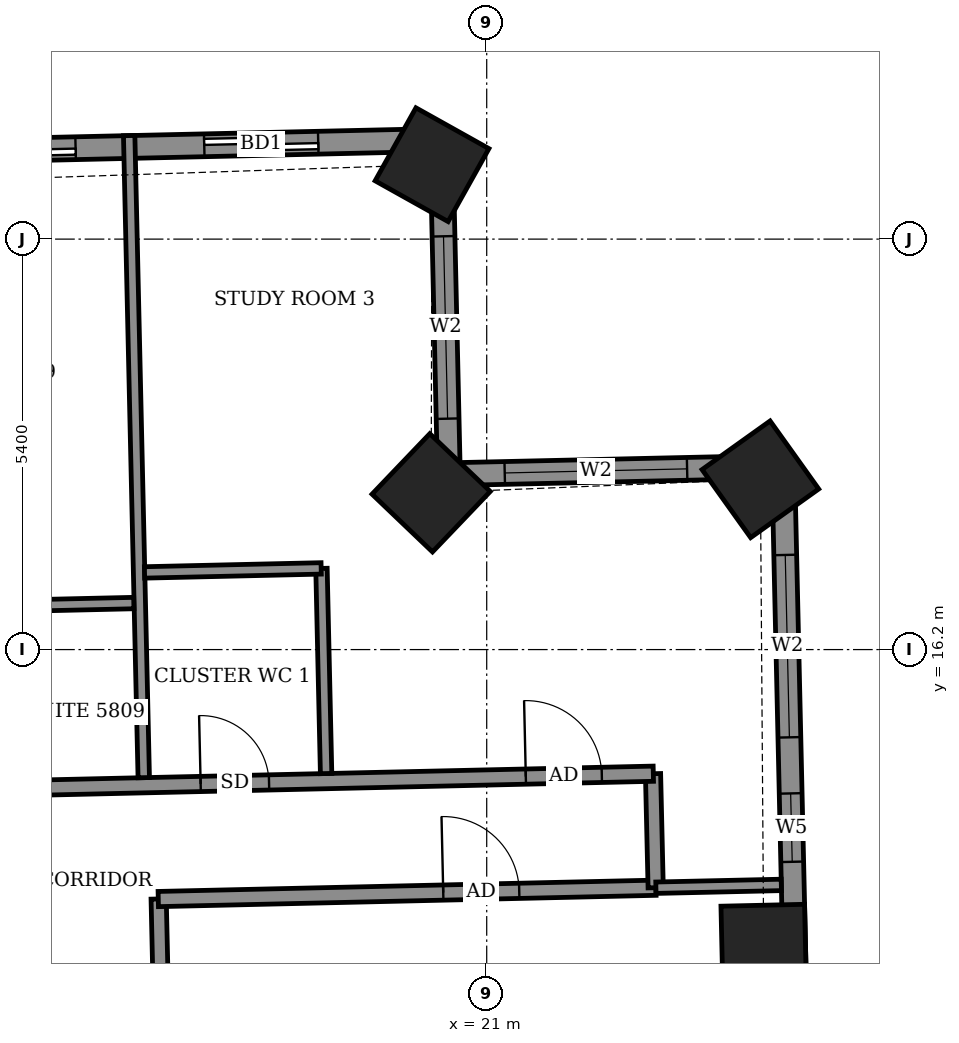
"""IFC4 building model, lengths in metres.
Left out: names, types, materials, properties, quantities, classifications, styles, units other than length and angle.
Written with IfcOpenShell. Run it as: python <this file> out.ifc"""

import sys

from ifc_helpers import new_model, si_unit, direction, frame, frame_2d, origin, origin_2d, place, context, subcontext, project, spatial, rectangle, extrude, element, fill, save


model = new_model("IFC4")
c1 = context("Model", 3, precision=1e-05, world=origin(), true_north=direction((0.0, 1.0)))
c2 = subcontext(c1, "Body", "Model", "MODEL_VIEW")
j1 = project(units=[si_unit("LENGTHUNIT", "METRE"), si_unit("PLANEANGLEUNIT", "RADIAN")], contexts=[c1])
p1 = place(None, origin())
s1 = spatial("IfcSite", under=j1, at=p1, CompositionType="ELEMENT")
p2 = place(p1, origin())
s2 = spatial("IfcBuilding", under=s1, at=p2, CompositionType="ELEMENT")
p3 = place(p2, frame((0.0, 0.0, 231.1)))
s3 = spatial("IfcBuildingStorey", under=s2, at=p3, CompositionType="ELEMENT", Elevation=231.1)
for number, where, z_axis, x_axis in (
    (1, (24.644, 12.287, -0.55), (0.0, 0.0, 1.0), (-0.023, 1.0, 0.0)),
    (2, (24.601, 18.44, -0.55), (0.0, 0.0, 1.0), (-0.581, 0.814, 0.0)),
    (3, (20.269, 18.262, -0.55), (0.0, 0.0, 1.0), (-0.723, 0.691, 0.0)),
    (4, (20.281, 22.579, -0.55), (0.0, 0.0, 1.0), (-0.873, 0.488, 0.0)),
):
    element("IfcColumn", number, at=place(p3, frame(where, z_axis=z_axis, x_axis=x_axis)), inside=s3, PredefinedType="COLUMN", context=c2, shape_type="SweptSolid", body=[
        extrude(rectangle(XDim=1.1, YDim=1.1, at=origin_2d()), origin(), (0.0, 0.0, 1.0), 3.6),
    ])
p4 = place(p3, frame((25.204, 5.285, 0.0), z_axis=(0.0, 0.0, 1.0), x_axis=(-0.022756783174, 0.999741030877, 0.0)))
e5 = element("IfcWall", 5, at=p4, inside=s3, PredefinedType="SOLIDWALL", context=c2, shape_type="SweptSolid", body=[
    extrude(rectangle(XDim=13.324, YDim=0.3, at=frame_2d((6.662, 0.0))), origin(), (0.0, 0.0, 1.0), 2.55),
])
p5 = place(p4, frame((3.999, 0.0, 0.0)))
e6 = element("IfcOpeningElement", 6, at=p5, cuts=e5, PredefinedType="OPENING", context=c2, shape_type="SweptSolid", body=[
    extrude(rectangle(XDim=1.5, YDim=2.4, at=frame_2d((0.75, 1.2))), frame((0.0, 0.16, 0.0), z_axis=(0.0, -1.0, 0.0), x_axis=(1.0, 0.0, 0.0)), (0.0, 0.0, 1.0), 0.32),
])
p6 = place(p4, frame((8.125, 0.0, 0.9)))
e7 = element("IfcOpeningElement", 7, at=p6, cuts=e5, PredefinedType="OPENING", context=c2, shape_type="SweptSolid", body=[
    extrude(rectangle(XDim=0.9, YDim=1.5, at=frame_2d((0.45, 0.75))), frame((0.0, 0.16, 0.0), z_axis=(0.0, -1.0, 0.0), x_axis=(1.0, 0.0, 0.0)), (0.0, 0.0, 1.0), 0.32),
])
p7 = place(p4, frame((9.763, 0.0, 0.9)))
e8 = element("IfcOpeningElement", 8, at=p7, cuts=e5, PredefinedType="OPENING", context=c2, shape_type="SweptSolid", body=[
    extrude(rectangle(XDim=2.4, YDim=1.5, at=frame_2d((1.2, 0.75))), frame((0.0, 0.16, 0.0), z_axis=(0.0, -1.0, 0.0), x_axis=(1.0, 0.0, 0.0)), (0.0, 0.0, 1.0), 0.32),
])
p8 = place(p3, frame((24.901, 18.606, 0.0), z_axis=(0.0, 0.0, 1.0), x_axis=(-0.999747476176, -0.022471846368, 0.0)))
e9 = element("IfcWall", 9, at=p8, inside=s3, PredefinedType="SOLIDWALL", context=c2, shape_type="SweptSolid", body=[
    extrude(rectangle(XDim=4.4, YDim=0.3, at=frame_2d((2.2, 0.0))), origin(), (0.0, 0.0, 1.0), 2.55),
])
p9 = place(p8, frame((1.265, 0.0, 0.9)))
e10 = element("IfcOpeningElement", 10, at=p9, cuts=e9, PredefinedType="OPENING", context=c2, shape_type="SweptSolid", body=[
    extrude(rectangle(XDim=2.4, YDim=1.5, at=frame_2d((1.2, 0.75))), frame((0.0, 0.16, 0.0), z_axis=(0.0, -1.0, 0.0), x_axis=(1.0, 0.0, 0.0)), (0.0, 0.0, 1.0), 0.32),
])
p10 = place(p3, frame((20.502, 18.507, 0.0), z_axis=(0.0, 0.0, 1.0), x_axis=(-0.02247683371, 0.999747364061, 0.0)))
e11 = element("IfcWall", 11, at=p10, inside=s3, PredefinedType="SOLIDWALL", context=c2, shape_type="SweptSolid", body=[
    extrude(rectangle(XDim=4.399, YDim=0.3, at=frame_2d((2.2, 0.0))), origin(), (0.0, 0.0, 1.0), 2.55),
])
p11 = place(p10, frame((0.731, 0.0, 0.9)))
e12 = element("IfcOpeningElement", 12, at=p11, cuts=e11, PredefinedType="OPENING", context=c2, shape_type="SweptSolid", body=[
    extrude(rectangle(XDim=2.4, YDim=1.5, at=frame_2d((1.2, 0.75))), frame((0.0, 0.16, 0.0), z_axis=(0.0, -1.0, 0.0), x_axis=(1.0, 0.0, 0.0)), (0.0, 0.0, 1.0), 0.32),
])
p12 = place(p3, frame((20.403, 22.905, 0.0), z_axis=(0.0, 0.0, 1.0), x_axis=(-0.99974298964, -0.022670568288, 0.0)))
e13 = element("IfcWall", 13, at=p12, inside=s3, PredefinedType="SOLIDWALL", context=c2, shape_type="SweptSolid", body=[
    extrude(rectangle(XDim=44.509, YDim=0.3, at=frame_2d((22.254, 0.0))), origin(), (0.0, 0.0, 1.0), 2.55),
])
p13 = place(p12, frame((1.62, 0.0, 0.0)))
e14 = element("IfcOpeningElement", 14, at=p13, cuts=e13, PredefinedType="OPENING", context=c2, shape_type="SweptSolid", body=[
    extrude(rectangle(XDim=1.5, YDim=2.4, at=frame_2d((0.75, 1.2))), frame((0.0, 0.16, 0.0), z_axis=(0.0, -1.0, 0.0), x_axis=(1.0, 0.0, 0.0)), (0.0, 0.0, 1.0), 0.32),
])
p14 = place(p12, frame((4.813, 0.0, 0.0)))
e15 = element("IfcOpeningElement", 15, at=p14, cuts=e13, PredefinedType="OPENING", context=c2, shape_type="SweptSolid", body=[
    extrude(rectangle(XDim=1.5, YDim=2.4, at=frame_2d((0.75, 1.2))), frame((0.0, 0.16, 0.0), z_axis=(0.0, -1.0, 0.0), x_axis=(1.0, 0.0, 0.0)), (0.0, 0.0, 1.0), 0.32),
])
p15 = place(p12, frame((9.833, 0.0, 0.0)))
e16 = element("IfcOpeningElement", 16, at=p15, cuts=e13, PredefinedType="OPENING", context=c2, shape_type="SweptSolid", body=[
    extrude(rectangle(XDim=1.5, YDim=2.4, at=frame_2d((0.75, 1.2))), frame((0.0, 0.16, 0.0), z_axis=(0.0, -1.0, 0.0), x_axis=(1.0, 0.0, 0.0)), (0.0, 0.0, 1.0), 0.32),
])
p16 = place(p12, frame((15.522, 0.0, 0.0)))
e17 = element("IfcOpeningElement", 17, at=p16, cuts=e13, PredefinedType="OPENING", context=c2, shape_type="SweptSolid", body=[
    extrude(rectangle(XDim=1.2, YDim=2.4, at=frame_2d((0.6, 1.2))), frame((0.0, 0.16, 0.0), z_axis=(0.0, -1.0, 0.0), x_axis=(1.0, 0.0, 0.0)), (0.0, 0.0, 1.0), 0.32),
])
p17 = place(p12, frame((18.558, 0.0, 0.0)))
e18 = element("IfcOpeningElement", 18, at=p17, cuts=e13, PredefinedType="OPENING", context=c2, shape_type="SweptSolid", body=[
    extrude(rectangle(XDim=1.5, YDim=2.4, at=frame_2d((0.75, 1.2))), frame((0.0, 0.16, 0.0), z_axis=(0.0, -1.0, 0.0), x_axis=(1.0, 0.0, 0.0)), (0.0, 0.0, 1.0), 0.32),
])
p18 = place(p12, frame((23.456, 0.0, 0.0)))
e19 = element("IfcOpeningElement", 19, at=p18, cuts=e13, PredefinedType="OPENING", context=c2, shape_type="SweptSolid", body=[
    extrude(rectangle(XDim=1.5, YDim=2.4, at=frame_2d((0.75, 1.2))), frame((0.0, 0.16, 0.0), z_axis=(0.0, -1.0, 0.0), x_axis=(1.0, 0.0, 0.0)), (0.0, 0.0, 1.0), 0.32),
])
p19 = place(p12, frame((26.89, 0.0, 0.0)))
e20 = element("IfcOpeningElement", 20, at=p19, cuts=e13, PredefinedType="OPENING", context=c2, shape_type="SweptSolid", body=[
    extrude(rectangle(XDim=1.5, YDim=2.4, at=frame_2d((0.75, 1.2))), frame((0.0, 0.16, 0.0), z_axis=(0.0, -1.0, 0.0), x_axis=(1.0, 0.0, 0.0)), (0.0, 0.0, 1.0), 0.32),
])
p20 = place(p12, frame((31.708, 0.0, 0.0)))
e21 = element("IfcOpeningElement", 21, at=p20, cuts=e13, PredefinedType="OPENING", context=c2, shape_type="SweptSolid", body=[
    extrude(rectangle(XDim=1.5, YDim=2.4, at=frame_2d((0.75, 1.2))), frame((0.0, 0.16, 0.0), z_axis=(0.0, -1.0, 0.0), x_axis=(1.0, 0.0, 0.0)), (0.0, 0.0, 1.0), 0.32),
])
p21 = place(p12, frame((35.024, 0.0, 0.0)))
e22 = element("IfcOpeningElement", 22, at=p21, cuts=e13, PredefinedType="OPENING", context=c2, shape_type="SweptSolid", body=[
    extrude(rectangle(XDim=1.5, YDim=2.4, at=frame_2d((0.75, 1.2))), frame((0.0, 0.16, 0.0), z_axis=(0.0, -1.0, 0.0), x_axis=(1.0, 0.0, 0.0)), (0.0, 0.0, 1.0), 0.32),
])
p22 = place(p12, frame((40.173, 0.0, 0.9)))
e23 = element("IfcOpeningElement", 23, at=p22, cuts=e13, PredefinedType="OPENING", context=c2, shape_type="SweptSolid", body=[
    extrude(rectangle(XDim=2.4, YDim=1.5, at=frame_2d((1.2, 0.75))), frame((0.0, 0.16, 0.0), z_axis=(0.0, -1.0, 0.0), x_axis=(1.0, 0.0, 0.0)), (0.0, 0.0, 1.0), 0.32),
])
p23 = place(p3, frame((16.803, 7.675, 0.0), z_axis=(0.0, 0.0, 1.0), x_axis=(-0.022667483124, 0.999743059595, 0.0)))
e24 = element("IfcWall", 24, at=p23, inside=s3, PredefinedType="PARTITIONING", context=c2, shape_type="SweptSolid", body=[
    extrude(rectangle(XDim=5.245, YDim=0.2, at=frame_2d((2.623, 0.0))), origin(), (0.0, 0.0, 1.0), 3.05),
])
p24 = place(p3, frame((16.679, 12.918, 0.0), z_axis=(0.0, 0.0, 1.0), x_axis=(0.99974139269, 0.022740882632, 0.0)))
e25 = element("IfcWall", 25, at=p24, inside=s3, PredefinedType="PARTITIONING", context=c2, shape_type="SweptSolid", body=[
    extrude(rectangle(XDim=6.549, YDim=0.2, at=frame_2d((3.274, 0.0))), origin(), (0.0, 0.0, 1.0), 3.05),
])
p25 = place(p24, frame((3.75, 0.0, 0.0)))
e26 = element("IfcOpeningElement", 26, at=p25, cuts=e25, PredefinedType="OPENING", context=c2, shape_type="SweptSolid", body=[
    extrude(rectangle(XDim=1.0, YDim=2.1, at=frame_2d((0.5, 1.05))), frame((0.0, 0.11, 0.0), z_axis=(0.0, -1.0, 0.0), x_axis=(1.0, 0.0, 0.0)), (0.0, 0.0, 1.0), 0.22),
])
p26 = place(p3, frame((23.223, 13.067, 0.0), z_axis=(0.0, 0.0, 1.0), x_axis=(-0.023268438023, 0.999729253244, 0.0)))
e27 = element("IfcWall", 27, at=p26, inside=s3, PredefinedType="PARTITIONING", context=c2, shape_type="SweptSolid", body=[
    extrude(rectangle(XDim=1.5, YDim=0.2, at=frame_2d((0.75, 0.0))), origin(), (0.0, 0.0, 1.0), 3.05),
])
p27 = place(p3, frame((23.226, 13.067, 0.0), z_axis=(0.0, 0.0, 1.0), x_axis=(0.999747154012, 0.022486174521, 0.0)))
e28 = element("IfcWall", 28, at=p27, inside=s3, PredefinedType="PARTITIONING", context=c2, shape_type="SweptSolid", body=[
    extrude(rectangle(XDim=1.65, YDim=0.15, at=frame_2d((0.825, 0.0))), origin(), (0.0, 0.0, 1.0), 2.55),
])
p28 = place(p3, frame((-27.652, 13.413, 0.0), z_axis=(0.0, 0.0, 1.0), x_axis=(0.999742610679, 0.022687273792, 0.0)))
e29 = element("IfcWall", 29, at=p28, inside=s3, PredefinedType="PARTITIONING", context=c2, shape_type="SweptSolid", body=[
    extrude(rectangle(XDim=50.857, YDim=0.2, at=frame_2d((25.429, 0.0))), origin(), (0.0, 0.0, 1.0), 3.05),
])
p29 = place(p28, frame((49.179, 0.0, 0.0)))
e30 = element("IfcOpeningElement", 30, at=p29, cuts=e29, PredefinedType="OPENING", context=c2, shape_type="SweptSolid", body=[
    extrude(rectangle(XDim=1.0, YDim=2.1, at=frame_2d((0.5, 1.05))), frame((0.0, 0.11, 0.0), z_axis=(0.0, -1.0, 0.0), x_axis=(1.0, 0.0, 0.0)), (0.0, 0.0, 1.0), 0.22),
])
p30 = place(p28, frame((44.9, 0.0, 0.0)))
e31 = element("IfcOpeningElement", 31, at=p30, cuts=e29, PredefinedType="OPENING", context=c2, shape_type="SweptSolid", body=[
    extrude(rectangle(XDim=0.9, YDim=2.1, at=frame_2d((0.45, 1.05))), frame((0.0, 0.11, 0.0), z_axis=(0.0, -1.0, 0.0), x_axis=(1.0, 0.0, 0.0)), (0.0, 0.0, 1.0), 0.22),
])
p31 = place(p28, frame((40.375, 0.0, 0.0)))
e32 = element("IfcOpeningElement", 32, at=p31, cuts=e29, PredefinedType="OPENING", context=c2, shape_type="SweptSolid", body=[
    extrude(rectangle(XDim=0.9, YDim=2.1, at=frame_2d((0.45, 1.05))), frame((0.0, 0.11, 0.0), z_axis=(0.0, -1.0, 0.0), x_axis=(1.0, 0.0, 0.0)), (0.0, 0.0, 1.0), 0.22),
])
p32 = place(p28, frame((38.425, 0.0, 0.0)))
e33 = element("IfcOpeningElement", 33, at=p32, cuts=e29, PredefinedType="OPENING", context=c2, shape_type="SweptSolid", body=[
    extrude(rectangle(XDim=0.9, YDim=2.1, at=frame_2d((0.45, 1.05))), frame((0.0, 0.11, 0.0), z_axis=(0.0, -1.0, 0.0), x_axis=(1.0, 0.0, 0.0)), (0.0, 0.0, 1.0), 0.22),
])
p33 = place(p28, frame((31.625, 0.0, 0.0)))
e34 = element("IfcOpeningElement", 34, at=p33, cuts=e29, PredefinedType="OPENING", context=c2, shape_type="SweptSolid", body=[
    extrude(rectangle(XDim=0.9, YDim=2.1, at=frame_2d((0.45, 1.05))), frame((0.0, 0.11, 0.0), z_axis=(0.0, -1.0, 0.0), x_axis=(1.0, 0.0, 0.0)), (0.0, 0.0, 1.0), 0.22),
])
p34 = place(p28, frame((29.7, 0.0, 0.0)))
e35 = element("IfcOpeningElement", 35, at=p34, cuts=e29, PredefinedType="OPENING", context=c2, shape_type="SweptSolid", body=[
    extrude(rectangle(XDim=0.9, YDim=2.1, at=frame_2d((0.45, 1.05))), frame((0.0, 0.11, 0.0), z_axis=(0.0, -1.0, 0.0), x_axis=(1.0, 0.0, 0.0)), (0.0, 0.0, 1.0), 0.22),
])
p35 = place(p28, frame((22.95, 0.0, 0.0)))
e36 = element("IfcOpeningElement", 36, at=p35, cuts=e29, PredefinedType="OPENING", context=c2, shape_type="SweptSolid", body=[
    extrude(rectangle(XDim=0.9, YDim=2.1, at=frame_2d((0.45, 1.05))), frame((0.0, 0.11, 0.0), z_axis=(0.0, -1.0, 0.0), x_axis=(1.0, 0.0, 0.0)), (0.0, 0.0, 1.0), 0.22),
])
p36 = place(p28, frame((20.95, 0.0, 0.0)))
e37 = element("IfcOpeningElement", 37, at=p36, cuts=e29, PredefinedType="OPENING", context=c2, shape_type="SweptSolid", body=[
    extrude(rectangle(XDim=0.9, YDim=2.1, at=frame_2d((0.45, 1.05))), frame((0.0, 0.11, 0.0), z_axis=(0.0, -1.0, 0.0), x_axis=(1.0, 0.0, 0.0)), (0.0, 0.0, 1.0), 0.22),
])
p37 = place(p28, frame((14.15, 0.0, 0.0)))
e38 = element("IfcOpeningElement", 38, at=p37, cuts=e29, PredefinedType="OPENING", context=c2, shape_type="SweptSolid", body=[
    extrude(rectangle(XDim=0.9, YDim=2.1, at=frame_2d((0.45, 1.05))), frame((0.0, 0.11, 0.0), z_axis=(0.0, -1.0, 0.0), x_axis=(1.0, 0.0, 0.0)), (0.0, 0.0, 1.0), 0.22),
])
p38 = place(p28, frame((12.2, 0.0, 0.0)))
e39 = element("IfcOpeningElement", 39, at=p38, cuts=e29, PredefinedType="OPENING", context=c2, shape_type="SweptSolid", body=[
    extrude(rectangle(XDim=0.9, YDim=2.1, at=frame_2d((0.45, 1.05))), frame((0.0, 0.11, 0.0), z_axis=(0.0, -1.0, 0.0), x_axis=(1.0, 0.0, 0.0)), (0.0, 0.0, 1.0), 0.22),
])
p39 = place(p28, frame((2.05, 0.0, 0.0)))
e40 = element("IfcOpeningElement", 40, at=p39, cuts=e29, PredefinedType="OPENING", context=c2, shape_type="SweptSolid", body=[
    extrude(rectangle(XDim=1.0, YDim=2.1, at=frame_2d((0.5, 1.05))), frame((0.0, 0.11, 0.0), z_axis=(0.0, -1.0, 0.0), x_axis=(1.0, 0.0, 0.0)), (0.0, 0.0, 1.0), 0.22),
])
p40 = place(p28, frame((7.45, 0.0, 0.0)))
e41 = element("IfcOpeningElement", 41, at=p40, cuts=e29, PredefinedType="OPENING", context=c2, shape_type="SweptSolid", body=[
    extrude(rectangle(XDim=0.9, YDim=2.1, at=frame_2d((0.45, 1.05))), frame((0.0, 0.11, 0.0), z_axis=(0.0, -1.0, 0.0), x_axis=(1.0, 0.0, 0.0)), (0.0, 0.0, 1.0), 0.22),
])
p41 = place(p3, frame((16.488, 14.515, 0.0), z_axis=(0.0, 0.0, 1.0), x_axis=(-0.022740440012, 0.999741402758, 0.0)))
e42 = element("IfcWall", 42, at=p41, inside=s3, PredefinedType="PARTITIONING", context=c2, shape_type="SweptSolid", body=[
    extrude(rectangle(XDim=8.449, YDim=0.15, at=frame_2d((4.225, 0.0))), origin(), (0.0, 0.0, 1.0), 2.55),
])
p42 = place(p3, frame((18.887, 14.569, 0.0), z_axis=(0.0, 0.0, 1.0), x_axis=(-0.02260842146, 0.999744396973, 0.0)))
e43 = element("IfcWall", 43, at=p42, inside=s3, PredefinedType="PARTITIONING", context=c2, shape_type="SweptSolid", body=[
    extrude(rectangle(XDim=2.7, YDim=0.15, at=frame_2d((1.35, 0.0))), origin(), (0.0, 0.0, 1.0), 3.05),
])
p43 = place(p3, frame((14.032, 16.759, 0.0), z_axis=(0.0, 0.0, 1.0), x_axis=(0.999740478815, 0.022781023197, 0.0)))
e44 = element("IfcWall", 44, at=p43, inside=s3, PredefinedType="PARTITIONING", context=c2, shape_type="SweptSolid", body=[
    extrude(rectangle(XDim=2.325, YDim=0.15, at=frame_2d((1.163, 0.0))), origin(), (0.0, 0.0, 1.0), 3.05),
])
p44 = place(p3, frame((16.498, 17.215, 0.0), z_axis=(0.0, 0.0, 1.0), x_axis=(0.999740260747, 0.02279059109, 0.0)))
e45 = element("IfcWall", 45, at=p44, inside=s3, PredefinedType="PARTITIONING", context=c2, shape_type="SweptSolid", body=[
    extrude(rectangle(XDim=2.324, YDim=0.15, at=frame_2d((1.162, 0.0))), origin(), (0.0, 0.0, 1.0), 3.05),
])
p45 = place(p6, origin())
e46 = element("IfcWindow", 46, at=p45, inside=s3, PartitioningType="SINGLE_PANEL", PredefinedType="WINDOW", context=c2, shape_type="SweptSolid", body=[
    extrude(rectangle(XDim=0.9, YDim=1.5, at=frame_2d((0.45, 0.75))), frame((0.0, 0.03, 0.0), z_axis=(0.0, -1.0, 0.0), x_axis=(1.0, 0.0, 0.0)), (0.0, 0.0, 1.0), 0.06),
])
fill(e7, e46)
p46 = place(p7, origin())
e47 = element("IfcWindow", 47, at=p46, inside=s3, PartitioningType="DOUBLE_PANEL_VERTICAL", PredefinedType="WINDOW", context=c2, shape_type="SweptSolid", body=[
    extrude(rectangle(XDim=2.4, YDim=1.5, at=frame_2d((1.2, 0.75))), frame((0.0, 0.03, 0.0), z_axis=(0.0, -1.0, 0.0), x_axis=(1.0, 0.0, 0.0)), (0.0, 0.0, 1.0), 0.06),
])
fill(e8, e47)
p47 = place(p9, origin())
e48 = element("IfcWindow", 48, at=p47, inside=s3, PartitioningType="DOUBLE_PANEL_VERTICAL", PredefinedType="WINDOW", context=c2, shape_type="SweptSolid", body=[
    extrude(rectangle(XDim=2.4, YDim=1.5, at=frame_2d((1.2, 0.75))), frame((0.0, 0.03, 0.0), z_axis=(0.0, -1.0, 0.0), x_axis=(1.0, 0.0, 0.0)), (0.0, 0.0, 1.0), 0.06),
])
fill(e10, e48)
p48 = place(p11, origin())
e49 = element("IfcWindow", 49, at=p48, inside=s3, PartitioningType="DOUBLE_PANEL_VERTICAL", PredefinedType="WINDOW", context=c2, shape_type="SweptSolid", body=[
    extrude(rectangle(XDim=2.4, YDim=1.5, at=frame_2d((1.2, 0.75))), frame((0.0, 0.03, 0.0), z_axis=(0.0, -1.0, 0.0), x_axis=(1.0, 0.0, 0.0)), (0.0, 0.0, 1.0), 0.06),
])
fill(e12, e49)
p49 = place(p13, origin())
e50 = element("IfcDoor", 50, at=p49, inside=s3, OperationType="SLIDING_TO_LEFT", PredefinedType="DOOR", context=c2, shape_type="SweptSolid", body=[
    extrude(rectangle(XDim=1.5, YDim=2.4, at=frame_2d((0.75, 1.2))), frame((0.0, 0.025, 0.0), z_axis=(0.0, -1.0, 0.0), x_axis=(1.0, 0.0, 0.0)), (0.0, 0.0, 1.0), 0.05),
])
fill(e14, e50)
p50 = place(p14, origin())
e51 = element("IfcDoor", 51, at=p50, inside=s3, OperationType="SLIDING_TO_LEFT", PredefinedType="DOOR", context=c2, shape_type="SweptSolid", body=[
    extrude(rectangle(XDim=1.5, YDim=2.4, at=frame_2d((0.75, 1.2))), frame((0.0, 0.025, 0.0), z_axis=(0.0, -1.0, 0.0), x_axis=(1.0, 0.0, 0.0)), (0.0, 0.0, 1.0), 0.05),
])
fill(e15, e51)
p51 = place(p25, origin())
e52 = element("IfcDoor", 52, at=p51, inside=s3, OperationType="SINGLE_SWING_RIGHT", PredefinedType="DOOR", context=c2, shape_type="SweptSolid", body=[
    extrude(rectangle(XDim=1.0, YDim=2.1, at=frame_2d((0.5, 1.05))), frame((0.0, 0.025, 0.0), z_axis=(0.0, -1.0, 0.0), x_axis=(1.0, 0.0, 0.0)), (0.0, 0.0, 1.0), 0.05),
])
fill(e26, e52)
p52 = place(p29, origin())
e53 = element("IfcDoor", 53, at=p52, inside=s3, OperationType="SINGLE_SWING_LEFT", PredefinedType="DOOR", context=c2, shape_type="SweptSolid", body=[
    extrude(rectangle(XDim=1.0, YDim=2.1, at=frame_2d((0.5, 1.05))), frame((0.0, 0.025, 0.0), z_axis=(0.0, -1.0, 0.0), x_axis=(1.0, 0.0, 0.0)), (0.0, 0.0, 1.0), 0.05),
])
fill(e30, e53)
p53 = place(p30, origin())
e54 = element("IfcDoor", 54, at=p53, inside=s3, OperationType="SINGLE_SWING_RIGHT", PredefinedType="DOOR", context=c2, shape_type="SweptSolid", body=[
    extrude(rectangle(XDim=0.9, YDim=2.1, at=frame_2d((0.45, 1.05))), frame((0.0, 0.025, 0.0), z_axis=(0.0, -1.0, 0.0), x_axis=(1.0, 0.0, 0.0)), (0.0, 0.0, 1.0), 0.05),
])
fill(e31, e54)
save(model, sys.argv[1])
